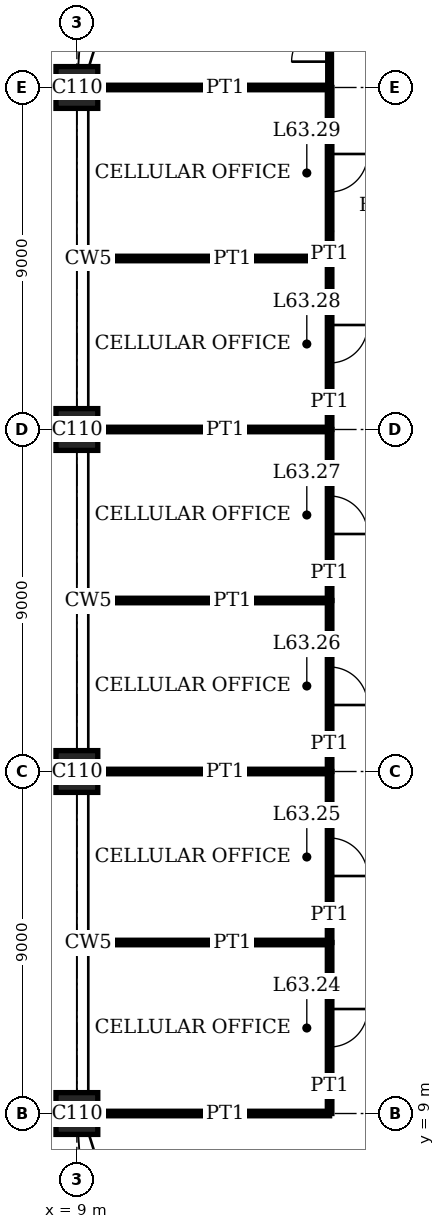
"""IFC4 building model, lengths in metres.
Left out: names, types, materials, properties, quantities, classifications, styles, units other than length and angle.
Written with IfcOpenShell. Run it as: python <this file> out.ifc"""

import sys

from ifc_helpers import new_model, si_unit, direction, frame, frame_2d, origin, origin_2d, place, context, subcontext, project, spatial, rectangle, extrude, element, fill, save


model = new_model("IFC4")
c1 = context("Model", 3, precision=1e-05, world=origin(), true_north=direction((0.0, 1.0)))
c2 = subcontext(c1, "Body", "Model", "MODEL_VIEW")
j1 = project(units=[si_unit("LENGTHUNIT", "METRE"), si_unit("PLANEANGLEUNIT", "RADIAN")], contexts=[c1])
p1 = place(None, origin())
s1 = spatial("IfcSite", under=j1, at=p1, CompositionType="ELEMENT")
p2 = place(p1, origin())
s2 = spatial("IfcBuilding", under=s1, at=p2, CompositionType="ELEMENT")
p3 = place(p2, frame((0.0, 0.0, 259.4)))
s3 = spatial("IfcBuildingStorey", under=s2, at=p3, CompositionType="ELEMENT", Elevation=259.4)
for number, where, z_axis, x_axis in (
    (1, (9.0, 9.0, 0.0), (0.0, 0.0, 1.0), (1.0, 0.0, 0.0)),
    (2, (9.0, 18.0, 0.0), (0.0, 0.0, 1.0), (1.0, 0.0, 0.0)),
    (3, (9.0, 27.0, 0.0), (0.0, 0.0, 1.0), (1.0, 0.0, 0.0)),
    (4, (9.0, 36.0, 0.0), (0.0, 0.0, 1.0), (1.0, 0.0, 0.0)),
):
    element("IfcColumn", number, at=place(p3, frame(where, z_axis=z_axis, x_axis=x_axis)), inside=s3, PredefinedType="COLUMN", context=c2, shape_type="SweptSolid", body=[
        extrude(rectangle(XDim=1.1, YDim=1.1, at=origin_2d()), origin(), (0.0, 0.0, 1.0), 4.0),
    ])
p4 = place(p3, frame((9.55, 9.0, 0.0), z_axis=(0.0, 0.0, 1.0), x_axis=(1.0, 0.0, 0.0)))
e5 = element("IfcWall", 5, at=p4, inside=s3, PredefinedType="PARTITIONING", context=c2, shape_type="SweptSolid", body=[
    extrude(rectangle(XDim=6.1, YDim=0.12, at=frame_2d((3.05, 0.0))), origin(), (0.0, 0.0, 1.0), 3.05),
])
p5 = place(p3, frame((9.31, 13.5, 0.0), z_axis=(0.0, 0.0, 1.0), x_axis=(1.0, 0.0, 0.0)))
e6 = element("IfcWall", 6, at=p5, inside=s3, PredefinedType="PARTITIONING", context=c2, shape_type="SweptSolid", body=[
    extrude(rectangle(XDim=6.34, YDim=0.12, at=frame_2d((3.17, 0.0))), origin(), (0.0, 0.0, 1.0), 3.1),
])
p6 = place(p3, frame((9.55, 18.0, 0.0), z_axis=(0.0, 0.0, 1.0), x_axis=(1.0, 0.0, 0.0)))
e7 = element("IfcWall", 7, at=p6, inside=s3, PredefinedType="PARTITIONING", context=c2, shape_type="SweptSolid", body=[
    extrude(rectangle(XDim=6.1, YDim=0.12, at=frame_2d((3.05, 0.0))), origin(), (0.0, 0.0, 1.0), 3.05),
])
p7 = place(p3, frame((9.31, 22.5, 0.0), z_axis=(0.0, 0.0, 1.0), x_axis=(1.0, 0.0, 0.0)))
e8 = element("IfcWall", 8, at=p7, inside=s3, PredefinedType="PARTITIONING", context=c2, shape_type="SweptSolid", body=[
    extrude(rectangle(XDim=6.34, YDim=0.12, at=frame_2d((3.17, 0.0))), origin(), (0.0, 0.0, 1.0), 3.1),
])
p8 = place(p3, frame((9.55, 27.0, 0.0), z_axis=(0.0, 0.0, 1.0), x_axis=(1.0, 0.0, 0.0)))
e9 = element("IfcWall", 9, at=p8, inside=s3, PredefinedType="PARTITIONING", context=c2, shape_type="SweptSolid", body=[
    extrude(rectangle(XDim=6.1, YDim=0.12, at=frame_2d((3.05, 0.0))), origin(), (0.0, 0.0, 1.0), 3.05),
])
p9 = place(p3, frame((9.31, 31.5, 0.0), z_axis=(0.0, 0.0, 1.0), x_axis=(1.0, 0.0, 0.0)))
e10 = element("IfcWall", 10, at=p9, inside=s3, PredefinedType="PARTITIONING", context=c2, shape_type="SweptSolid", body=[
    extrude(rectangle(XDim=6.34, YDim=0.12, at=frame_2d((3.17, 0.0))), origin(), (0.0, 0.0, 1.0), 3.1),
])
p10 = place(p3, frame((9.55, 36.0, 0.0), z_axis=(0.0, 0.0, 1.0), x_axis=(1.0, 0.0, 0.0)))
e11 = element("IfcWall", 11, at=p10, inside=s3, PredefinedType="PARTITIONING", context=c2, shape_type="SweptSolid", body=[
    extrude(rectangle(XDim=6.1, YDim=0.12, at=frame_2d((3.05, 0.0))), origin(), (0.0, 0.0, 1.0), 3.05),
])
p11 = place(p3, frame((15.65, 9.0, 0.0), z_axis=(0.0, 0.0, 1.0), x_axis=(0.0, 1.0, 0.0)))
e12 = element("IfcWall", 12, at=p11, inside=s3, PredefinedType="PARTITIONING", context=c2, shape_type="SweptSolid", body=[
    extrude(rectangle(XDim=4.5, YDim=0.12, at=frame_2d((2.25, 0.0))), origin(), (0.0, 0.0, 1.0), 3.75),
])
p12 = place(p11, frame((1.75, 0.0, 0.0)))
e13 = element("IfcOpeningElement", 13, at=p12, cuts=e12, PredefinedType="OPENING", context=c2, shape_type="SweptSolid", body=[
    extrude(rectangle(XDim=1.0, YDim=2.4, at=frame_2d((0.5, 1.2))), frame((0.0, 0.07, 0.0), z_axis=(0.0, -1.0, 0.0), x_axis=(1.0, 0.0, 0.0)), (0.0, 0.0, 1.0), 0.14),
])
p13 = place(p3, frame((15.65, 13.5, 0.0), z_axis=(0.0, 0.0, 1.0), x_axis=(0.0, 1.0, 0.0)))
e14 = element("IfcWall", 14, at=p13, inside=s3, PredefinedType="PARTITIONING", context=c2, shape_type="SweptSolid", body=[
    extrude(rectangle(XDim=4.5, YDim=0.12, at=frame_2d((2.25, 0.0))), origin(), (0.0, 0.0, 1.0), 3.75),
])
p14 = place(p13, frame((1.75, 0.0, 0.0)))
e15 = element("IfcOpeningElement", 15, at=p14, cuts=e14, PredefinedType="OPENING", context=c2, shape_type="SweptSolid", body=[
    extrude(rectangle(XDim=1.0, YDim=2.4, at=frame_2d((0.5, 1.2))), frame((0.0, 0.07, 0.0), z_axis=(0.0, -1.0, 0.0), x_axis=(1.0, 0.0, 0.0)), (0.0, 0.0, 1.0), 0.14),
])
p15 = place(p3, frame((15.65, 18.0, 0.0), z_axis=(0.0, 0.0, 1.0), x_axis=(0.0, 1.0, 0.0)))
e16 = element("IfcWall", 16, at=p15, inside=s3, PredefinedType="PARTITIONING", context=c2, shape_type="SweptSolid", body=[
    extrude(rectangle(XDim=4.5, YDim=0.12, at=frame_2d((2.25, 0.0))), origin(), (0.0, 0.0, 1.0), 3.75),
])
p16 = place(p15, frame((1.75, 0.0, 0.0)))
e17 = element("IfcOpeningElement", 17, at=p16, cuts=e16, PredefinedType="OPENING", context=c2, shape_type="SweptSolid", body=[
    extrude(rectangle(XDim=1.0, YDim=2.4, at=frame_2d((0.5, 1.2))), frame((0.0, 0.07, 0.0), z_axis=(0.0, -1.0, 0.0), x_axis=(1.0, 0.0, 0.0)), (0.0, 0.0, 1.0), 0.14),
])
p17 = place(p3, frame((15.65, 22.5, 0.0), z_axis=(0.0, 0.0, 1.0), x_axis=(0.0, 1.0, 0.0)))
e18 = element("IfcWall", 18, at=p17, inside=s3, PredefinedType="PARTITIONING", context=c2, shape_type="SweptSolid", body=[
    extrude(rectangle(XDim=4.5, YDim=0.12, at=frame_2d((2.25, 0.0))), origin(), (0.0, 0.0, 1.0), 3.75),
])
p18 = place(p17, frame((1.75, 0.0, 0.0)))
e19 = element("IfcOpeningElement", 19, at=p18, cuts=e18, PredefinedType="OPENING", context=c2, shape_type="SweptSolid", body=[
    extrude(rectangle(XDim=1.0, YDim=2.4, at=frame_2d((0.5, 1.2))), frame((0.0, 0.07, 0.0), z_axis=(0.0, -1.0, 0.0), x_axis=(1.0, 0.0, 0.0)), (0.0, 0.0, 1.0), 0.14),
])
p19 = place(p3, frame((15.65, 27.0, 0.0), z_axis=(0.0, 0.0, 1.0), x_axis=(0.0, 1.0, 0.0)))
e20 = element("IfcWall", 20, at=p19, inside=s3, PredefinedType="PARTITIONING", context=c2, shape_type="SweptSolid", body=[
    extrude(rectangle(XDim=4.5, YDim=0.12, at=frame_2d((2.25, 0.0))), origin(), (0.0, 0.0, 1.0), 3.75),
])
p20 = place(p19, frame((1.75, 0.0, 0.0)))
e21 = element("IfcOpeningElement", 21, at=p20, cuts=e20, PredefinedType="OPENING", context=c2, shape_type="SweptSolid", body=[
    extrude(rectangle(XDim=1.0, YDim=2.4, at=frame_2d((0.5, 1.2))), frame((0.0, 0.07, 0.0), z_axis=(0.0, -1.0, 0.0), x_axis=(1.0, 0.0, 0.0)), (0.0, 0.0, 1.0), 0.14),
])
p21 = place(p3, frame((15.65, 31.5, 0.0), z_axis=(0.0, 0.0, 1.0), x_axis=(0.0, 1.0, 0.0)))
e22 = element("IfcWall", 22, at=p21, inside=s3, PredefinedType="PARTITIONING", context=c2, shape_type="SweptSolid", body=[
    extrude(rectangle(XDim=4.5, YDim=0.12, at=frame_2d((2.25, 0.0))), origin(), (0.0, 0.0, 1.0), 3.75),
])
p22 = place(p21, frame((1.75, 0.0, 0.0)))
e23 = element("IfcOpeningElement", 23, at=p22, cuts=e22, PredefinedType="OPENING", context=c2, shape_type="SweptSolid", body=[
    extrude(rectangle(XDim=1.0, YDim=2.4, at=frame_2d((0.5, 1.2))), frame((0.0, 0.07, 0.0), z_axis=(0.0, -1.0, 0.0), x_axis=(1.0, 0.0, 0.0)), (0.0, 0.0, 1.0), 0.14),
])
p23 = place(p3, frame((15.65, 36.01, 0.0), z_axis=(0.0, 0.0, 1.0), x_axis=(0.0, 1.0, 0.0)))
e24 = element("IfcWall", 24, at=p23, inside=s3, PredefinedType="PARTITIONING", context=c2, shape_type="SweptSolid", body=[
    extrude(rectangle(XDim=2.34, YDim=0.1, at=frame_2d((1.17, 0.0))), origin(), (0.0, 0.0, 1.0), 3.75),
])
p24 = place(p23, frame((0.67, 0.0, 0.0)))
e25 = element("IfcOpeningElement", 25, at=p24, cuts=e24, PredefinedType="OPENING", context=c2, shape_type="SweptSolid", body=[
    extrude(rectangle(XDim=1.0, YDim=2.4, at=frame_2d((0.5, 1.2))), frame((0.0, 0.06, 0.0), z_axis=(0.0, -1.0, 0.0), x_axis=(1.0, 0.0, 0.0)), (0.0, 0.0, 1.0), 0.12),
])
p25 = place(p12, origin())
e26 = element("IfcDoor", 26, at=p25, inside=s3, OperationType="SINGLE_SWING_RIGHT", PredefinedType="DOOR", context=c2, shape_type="SweptSolid", body=[
    extrude(rectangle(XDim=1.0, YDim=2.4, at=frame_2d((0.5, 1.2))), frame((0.0, 0.025, 0.0), z_axis=(0.0, -1.0, 0.0), x_axis=(1.0, 0.0, 0.0)), (0.0, 0.0, 1.0), 0.05),
])
fill(e13, e26)
p26 = place(p14, origin())
e27 = element("IfcDoor", 27, at=p26, inside=s3, OperationType="SINGLE_SWING_LEFT", PredefinedType="DOOR", context=c2, shape_type="SweptSolid", body=[
    extrude(rectangle(XDim=1.0, YDim=2.4, at=frame_2d((0.5, 1.2))), frame((0.0, 0.025, 0.0), z_axis=(0.0, -1.0, 0.0), x_axis=(1.0, 0.0, 0.0)), (0.0, 0.0, 1.0), 0.05),
])
fill(e15, e27)
p27 = place(p16, origin())
e28 = element("IfcDoor", 28, at=p27, inside=s3, OperationType="SINGLE_SWING_LEFT", PredefinedType="DOOR", context=c2, shape_type="SweptSolid", body=[
    extrude(rectangle(XDim=1.0, YDim=2.4, at=frame_2d((0.5, 1.2))), frame((0.0, 0.025, 0.0), z_axis=(0.0, -1.0, 0.0), x_axis=(1.0, 0.0, 0.0)), (0.0, 0.0, 1.0), 0.05),
])
fill(e17, e28)
p28 = place(p18, origin())
e29 = element("IfcDoor", 29, at=p28, inside=s3, OperationType="SINGLE_SWING_LEFT", PredefinedType="DOOR", context=c2, shape_type="SweptSolid", body=[
    extrude(rectangle(XDim=1.0, YDim=2.4, at=frame_2d((0.5, 1.2))), frame((0.0, 0.025, 0.0), z_axis=(0.0, -1.0, 0.0), x_axis=(1.0, 0.0, 0.0)), (0.0, 0.0, 1.0), 0.05),
])
fill(e19, e29)
p29 = place(p20, origin())
e30 = element("IfcDoor", 30, at=p29, inside=s3, OperationType="SINGLE_SWING_RIGHT", PredefinedType="DOOR", context=c2, shape_type="SweptSolid", body=[
    extrude(rectangle(XDim=1.0, YDim=2.4, at=frame_2d((0.5, 1.2))), frame((0.0, 0.025, 0.0), z_axis=(0.0, -1.0, 0.0), x_axis=(1.0, 0.0, 0.0)), (0.0, 0.0, 1.0), 0.05),
])
fill(e21, e30)
p30 = place(p22, origin())
e31 = element("IfcDoor", 31, at=p30, inside=s3, OperationType="SINGLE_SWING_RIGHT", PredefinedType="DOOR", context=c2, shape_type="SweptSolid", body=[
    extrude(rectangle(XDim=1.0, YDim=2.4, at=frame_2d((0.5, 1.2))), frame((0.0, 0.025, 0.0), z_axis=(0.0, -1.0, 0.0), x_axis=(1.0, 0.0, 0.0)), (0.0, 0.0, 1.0), 0.05),
])
fill(e23, e31)
p31 = place(p24, origin())
e32 = element("IfcDoor", 32, at=p31, inside=s3, OperationType="SINGLE_SWING_RIGHT", PredefinedType="DOOR", context=c2, shape_type="SweptSolid", body=[
    extrude(rectangle(XDim=1.0, YDim=2.4, at=frame_2d((0.5, 1.2))), frame((0.0, 0.02, 0.0), z_axis=(0.0, -1.0, 0.0), x_axis=(1.0, 0.0, 0.0)), (0.0, 0.0, 1.0), 0.04),
])
fill(e25, e32)
save(model, sys.argv[1])
